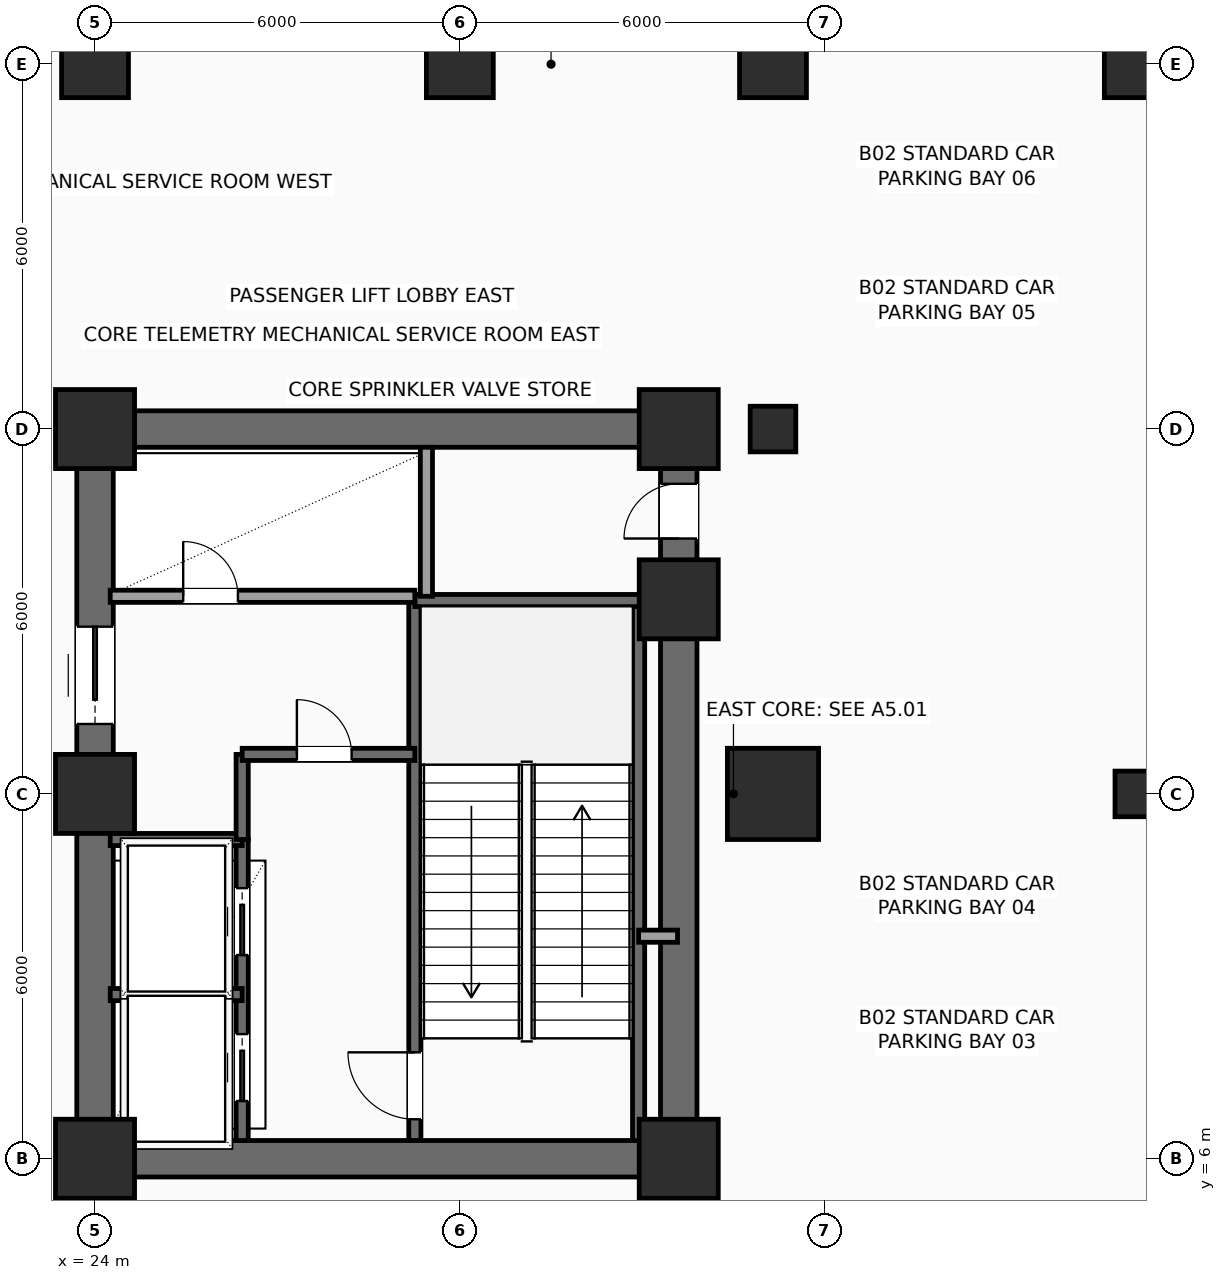
"""IFC4 building model, lengths in metres.
Left out: names, types, materials, properties, quantities, classifications, styles, units other than length and angle.
Written with IfcOpenShell. Run it as: python <this file> out.ifc"""

import sys

from ifc_helpers import new_model, si_unit, direction, frame, frame_2d, origin, origin_2d, place, context, subcontext, project, spatial, rectangle, hollow_rectangle, extrude, element, fill, save


model = new_model("IFC4")
c1 = context("Model", 3, precision=1e-05, world=origin(), true_north=direction((0.0, 1.0)))
c2 = subcontext(c1, "Body", "Model", "MODEL_VIEW")
j1 = project(units=[si_unit("LENGTHUNIT", "METRE"), si_unit("PLANEANGLEUNIT", "RADIAN")], contexts=[c1])
p1 = place(None, origin())
s1 = spatial("IfcSite", under=j1, at=p1, CompositionType="ELEMENT")
p2 = place(p1, origin())
s2 = spatial("IfcBuilding", under=s1, at=p2, CompositionType="ELEMENT")
p3 = place(p2, frame((0.0, 0.0, -9.6)))
s3 = spatial("IfcBuildingStorey", under=s2, at=p3, CompositionType="ELEMENT", Elevation=-9.6)
for number, where, z_axis, x_axis in (
    (1, (24.0, 6.0, 0.0), (0.0, 0.0, 1.0), (1.0, 0.0, 0.0)),
    (2, (24.0, 12.0, 0.0), (0.0, 0.0, 1.0), (1.0, 0.0, 0.0)),
    (3, (24.0, 18.0, 0.0), (0.0, 0.0, 1.0), (1.0, 0.0, 0.0)),
    (4, (33.6, 6.0, 0.0), (0.0, 0.0, 1.0), (1.0, 0.0, 0.0)),
    (5, (33.6, 15.2, 0.0), (0.0, 0.0, 1.0), (1.0, 0.0, 0.0)),
    (6, (33.6, 18.0, 0.0), (0.0, 0.0, 1.0), (1.0, 0.0, 0.0)),
):
    element("IfcColumn", number, at=place(p3, frame(where, z_axis=z_axis, x_axis=x_axis)), inside=s3, PredefinedType="COLUMN", context=c2, shape_type="SweptSolid", body=[
        extrude(rectangle(XDim=1.3, YDim=1.3, at=origin_2d()), origin(), (0.0, 0.0, 1.0), 4.8),
    ])
for number, where, z_axis, x_axis in (
    (7, (24.0, 24.0, 0.0), (0.0, 0.0, 1.0), (1.0, 0.0, 0.0)),
    (8, (30.0, 24.0, 0.0), (0.0, 0.0, 1.0), (1.0, 0.0, 0.0)),
):
    element("IfcColumn", number, at=place(p3, frame(where, z_axis=z_axis, x_axis=x_axis)), inside=s3, PredefinedType="COLUMN", context=c2, shape_type="SweptSolid", body=[
        extrude(rectangle(XDim=1.1, YDim=1.1, at=origin_2d()), origin(), (0.0, 0.0, 1.0), 4.8),
    ])
p4 = place(p3, frame((35.15, 12.0, 0.0), z_axis=(0.0, 0.0, 1.0), x_axis=(1.0, 0.0, 0.0)))
e9 = element("IfcColumn", 9, at=p4, inside=s3, PredefinedType="COLUMN", context=c2, shape_type="SweptSolid", body=[
    extrude(rectangle(XDim=1.5, YDim=1.5, at=origin_2d()), origin(), (0.0, 0.0, 1.0), 4.8),
])
p5 = place(p3, frame((35.15, 18.0, 0.0), z_axis=(0.0, 0.0, 1.0), x_axis=(1.0, 0.0, 0.0)))
e10 = element("IfcColumn", 10, at=p5, inside=s3, PredefinedType="COLUMN", context=c2, shape_type="SweptSolid", body=[
    extrude(hollow_rectangle(XDim=0.75, YDim=0.75, WallThickness=0.035, InnerFilletRadius=0.035, OuterFilletRadius=0.05, at=origin_2d()), origin(), (0.0, 0.0, 1.0), 4.8),
])
p6 = place(p3, frame((35.15, 24.0, 0.0), z_axis=(0.0, 0.0, 1.0), x_axis=(1.0, 0.0, 0.0)))
e11 = element("IfcColumn", 11, at=p6, inside=s3, PredefinedType="COLUMN", context=c2, shape_type="SweptSolid", body=[
    extrude(rectangle(XDim=1.1, YDim=1.1, at=origin_2d()), origin(), (0.0, 0.0, 1.0), 4.8),
])
p7 = place(p3, frame((41.15, 12.0, 0.0), z_axis=(0.0, 0.0, 1.0), x_axis=(1.0, 0.0, 0.0)))
e12 = element("IfcColumn", 12, at=p7, inside=s3, PredefinedType="COLUMN", context=c2, shape_type="SweptSolid", body=[
    extrude(hollow_rectangle(XDim=0.75, YDim=0.75, WallThickness=0.035, InnerFilletRadius=0.035, OuterFilletRadius=0.05, at=origin_2d()), origin(), (0.0, 0.0, 1.0), 4.8),
])
p8 = place(p3, frame((41.15, 24.0, 0.0), z_axis=(0.0, 0.0, 1.0), x_axis=(1.0, 0.0, 0.0)))
e13 = element("IfcColumn", 13, at=p8, inside=s3, PredefinedType="COLUMN", context=c2, shape_type="SweptSolid", body=[
    extrude(rectangle(XDim=1.1, YDim=1.1, at=origin_2d()), origin(), (0.0, 0.0, 1.0), 4.8),
])
for number, where, z_axis, x_axis in (
    (14, (24.0, 6.0, 0.0), (0.0, 0.0, 1.0), (1.0, 0.0, 0.0)),
    (15, (24.0, 18.0, 0.0), (0.0, 0.0, 1.0), (1.0, 0.0, 0.0)),
):
    element("IfcWall", number, at=place(p3, frame(where, z_axis=z_axis, x_axis=x_axis)), inside=s3, PredefinedType="SHEAR", context=c2, shape_type="SweptSolid", body=[
        extrude(rectangle(XDim=9.6, YDim=0.6, at=frame_2d((4.8, 0.0))), origin(), (0.0, 0.0, 1.0), 4.475),
    ])
p9 = place(p3, frame((24.0, 6.0, 0.0), z_axis=(0.0, 0.0, 1.0), x_axis=(0.0, 1.0, 0.0)))
e16 = element("IfcWall", 16, at=p9, inside=s3, PredefinedType="SHEAR", context=c2, shape_type="SweptSolid", body=[
    extrude(rectangle(XDim=12.0, YDim=0.6, at=frame_2d((6.0, 0.0))), origin(), (0.0, 0.0, 1.0), 4.475),
])
p10 = place(p9, frame((7.15, 0.0, 0.0)))
e17 = element("IfcOpeningElement", 17, at=p10, cuts=e16, PredefinedType="OPENING", context=c2, shape_type="SweptSolid", body=[
    extrude(rectangle(XDim=1.6, YDim=2.3, at=frame_2d((0.8, 1.15))), frame((0.0, 0.31, 0.0), z_axis=(0.0, -1.0, 0.0), x_axis=(1.0, 0.0, 0.0)), (0.0, 0.0, 1.0), 0.62),
])
p11 = place(p3, frame((33.6, 6.0, 0.0), z_axis=(0.0, 0.0, 1.0), x_axis=(0.0, 1.0, 0.0)))
e18 = element("IfcWall", 18, at=p11, inside=s3, PredefinedType="SHEAR", context=c2, shape_type="SweptSolid", body=[
    extrude(rectangle(XDim=12.0, YDim=0.6, at=frame_2d((6.0, 0.0))), origin(), (0.0, 0.0, 1.0), 4.475),
])
p12 = place(p11, frame((10.2, 0.0, 0.0)))
e19 = element("IfcOpeningElement", 19, at=p12, cuts=e18, PredefinedType="OPENING", context=c2, shape_type="SweptSolid", body=[
    extrude(rectangle(XDim=0.9, YDim=2.15, at=frame_2d((0.45, 1.075))), frame((0.0, 0.31, 0.0), z_axis=(0.0, -1.0, 0.0), x_axis=(1.0, 0.0, 0.0)), (0.0, 0.0, 1.0), 0.62),
])
p13 = place(p3, frame((29.26, 6.3, 0.0), z_axis=(0.0, 0.0, 1.0), x_axis=(0.0, 1.0, 0.0)))
e20 = element("IfcWall", 20, at=p13, inside=s3, PredefinedType="SHEAR", context=c2, shape_type="SweptSolid", body=[
    extrude(rectangle(XDim=8.88, YDim=0.2, at=frame_2d((4.44, 0.0))), origin(), (0.0, 0.0, 1.0), 4.475),
])
p14 = place(p13, frame((0.35, 0.0, 0.0)))
e21 = element("IfcOpeningElement", 21, at=p14, cuts=e20, PredefinedType="OPENING", context=c2, shape_type="SweptSolid", body=[
    extrude(rectangle(XDim=1.1, YDim=2.2, at=frame_2d((0.55, 1.1))), frame((0.0, 0.11, 0.0), z_axis=(0.0, -1.0, 0.0), x_axis=(1.0, 0.0, 0.0)), (0.0, 0.0, 1.0), 0.22),
])
p15 = place(p3, frame((32.94, 6.3, 0.0), z_axis=(0.0, 0.0, 1.0), x_axis=(0.0, 1.0, 0.0)))
e22 = element("IfcWall", 22, at=p15, inside=s3, PredefinedType="SHEAR", context=c2, shape_type="SweptSolid", body=[
    extrude(rectangle(XDim=8.88, YDim=0.2, at=frame_2d((4.44, 0.0))), origin(), (0.0, 0.0, 1.0), 4.475),
])
p16 = place(p3, frame((29.26, 15.18, 0.0), z_axis=(0.0, 0.0, 1.0), x_axis=(1.0, 0.0, 0.0)))
e23 = element("IfcWall", 23, at=p16, inside=s3, PredefinedType="SHEAR", context=c2, shape_type="SweptSolid", body=[
    extrude(rectangle(XDim=4.04, YDim=0.2, at=frame_2d((2.02, 0.0))), origin(), (0.0, 0.0, 1.0), 4.475),
])
p17 = place(p3, frame((26.42, 6.3, 0.0), z_axis=(0.0, 0.0, 1.0), x_axis=(0.0, 1.0, 0.0)))
e24 = element("IfcWall", 24, at=p17, inside=s3, PredefinedType="SHEAR", context=c2, shape_type="SweptSolid", body=[
    extrude(rectangle(XDim=4.95, YDim=0.2, at=frame_2d((2.475, 0.0))), origin(), (0.0, 0.0, 1.0), 4.475),
])
p18 = place(p17, frame((0.65, 0.0, 0.0)))
e25 = element("IfcOpeningElement", 25, at=p18, cuts=e24, PredefinedType="OPENING", context=c2, shape_type="SweptSolid", body=[
    extrude(rectangle(XDim=1.1, YDim=2.2, at=frame_2d((0.55, 1.1))), frame((0.0, 0.11, 0.0), z_axis=(0.0, -1.0, 0.0), x_axis=(1.0, 0.0, 0.0)), (0.0, 0.0, 1.0), 0.22),
])
p19 = place(p17, frame((3.05, 0.0, 0.0)))
e26 = element("IfcOpeningElement", 26, at=p19, cuts=e24, PredefinedType="OPENING", context=c2, shape_type="SweptSolid", body=[
    extrude(rectangle(XDim=1.1, YDim=2.2, at=frame_2d((0.55, 1.1))), frame((0.0, 0.11, 0.0), z_axis=(0.0, -1.0, 0.0), x_axis=(1.0, 0.0, 0.0)), (0.0, 0.0, 1.0), 0.22),
])
for number, where, z_axis, x_axis in (
    (27, (24.25, 8.7, 0.0), (0.0, 0.0, 1.0), (1.0, 0.0, 0.0)),
    (28, (24.25, 11.25, 0.0), (0.0, 0.0, 1.0), (1.0, 0.0, 0.0)),
):
    element("IfcWall", number, at=place(p3, frame(where, z_axis=z_axis, x_axis=x_axis)), inside=s3, PredefinedType="SHEAR", context=c2, shape_type="SweptSolid", body=[
        extrude(rectangle(XDim=2.17, YDim=0.2, at=frame_2d((1.085, 0.0))), origin(), (0.0, 0.0, 1.0), 4.475),
    ])
p20 = place(p3, frame((26.42, 11.25, 0.0), z_axis=(0.0, 0.0, 1.0), x_axis=(0.0, 1.0, 0.0)))
e29 = element("IfcWall", 29, at=p20, inside=s3, PredefinedType="SHEAR", context=c2, shape_type="SweptSolid", body=[
    extrude(rectangle(XDim=1.4, YDim=0.2, at=frame_2d((0.7, 0.0))), origin(), (0.0, 0.0, 1.0), 4.475),
])
p21 = place(p3, frame((26.42, 12.65, 0.0), z_axis=(0.0, 0.0, 1.0), x_axis=(1.0, 0.0, 0.0)))
e30 = element("IfcWall", 30, at=p21, inside=s3, PredefinedType="SHEAR", context=c2, shape_type="SweptSolid", body=[
    extrude(rectangle(XDim=2.84, YDim=0.2, at=frame_2d((1.42, 0.0))), origin(), (0.0, 0.0, 1.0), 4.475),
])
p22 = place(p21, frame((0.9, 0.0, 0.0)))
e31 = element("IfcOpeningElement", 31, at=p22, cuts=e30, PredefinedType="OPENING", context=c2, shape_type="SweptSolid", body=[
    extrude(rectangle(XDim=0.9, YDim=2.15, at=frame_2d((0.45, 1.075))), frame((0.0, 0.11, 0.0), z_axis=(0.0, -1.0, 0.0), x_axis=(1.0, 0.0, 0.0)), (0.0, 0.0, 1.0), 0.22),
])
p23 = place(p3, frame((32.94, 9.66, 0.0), z_axis=(0.0, 0.0, 1.0), x_axis=(1.0, 0.0, 0.0)))
e32 = element("IfcWall", 32, at=p23, inside=s3, PredefinedType="SOLIDWALL", context=c2, shape_type="SweptSolid", body=[
    extrude(rectangle(XDim=0.64, YDim=0.2, at=frame_2d((0.32, 0.0))), origin(), (0.0, 0.0, 1.0), 4.475),
])
p24 = place(p3, frame((24.25, 15.25, 0.0), z_axis=(0.0, 0.0, 1.0), x_axis=(1.0, 0.0, 0.0)))
e33 = element("IfcWall", 33, at=p24, inside=s3, PredefinedType="SOLIDWALL", context=c2, shape_type="SweptSolid", body=[
    extrude(rectangle(XDim=5.01, YDim=0.2, at=frame_2d((2.505, 0.0))), origin(), (0.0, 0.0, 1.0), 4.475),
])
p25 = place(p24, frame((1.2, 0.0, 0.0)))
e34 = element("IfcOpeningElement", 34, at=p25, cuts=e33, PredefinedType="OPENING", context=c2, shape_type="SweptSolid", body=[
    extrude(rectangle(XDim=0.9, YDim=2.15, at=frame_2d((0.45, 1.075))), frame((0.0, 0.11, 0.0), z_axis=(0.0, -1.0, 0.0), x_axis=(1.0, 0.0, 0.0)), (0.0, 0.0, 1.0), 0.22),
])
p26 = place(p3, frame((29.45, 15.25, 0.0), z_axis=(0.0, 0.0, 1.0), x_axis=(0.0, 1.0, 0.0)))
e35 = element("IfcWall", 35, at=p26, inside=s3, PredefinedType="SOLIDWALL", context=c2, shape_type="SweptSolid", body=[
    extrude(rectangle(XDim=2.45, YDim=0.2, at=frame_2d((1.225, 0.0))), origin(), (0.0, 0.0, 1.0), 4.475),
])
p27 = place(p10, origin())
e36 = element("IfcDoor", 36, at=p27, inside=s3, OperationType="DOUBLE_DOOR_SLIDING", PredefinedType="DOOR", context=c2, shape_type="SweptSolid", body=[
    extrude(rectangle(XDim=1.6, YDim=2.3, at=frame_2d((0.8, 1.15))), frame((0.0, 0.025, 0.0), z_axis=(0.0, -1.0, 0.0), x_axis=(1.0, 0.0, 0.0)), (0.0, 0.0, 1.0), 0.05),
])
fill(e17, e36)
p28 = place(p12, origin())
e37 = element("IfcDoor", 37, at=p28, inside=s3, OperationType="SINGLE_SWING_LEFT", PredefinedType="DOOR", context=c2, shape_type="SweptSolid", body=[
    extrude(rectangle(XDim=0.9, YDim=2.15, at=frame_2d((0.45, 1.075))), frame((0.0, 0.025, 0.0), z_axis=(0.0, -1.0, 0.0), x_axis=(1.0, 0.0, 0.0)), (0.0, 0.0, 1.0), 0.05),
])
fill(e19, e37)
p29 = place(p14, origin())
e38 = element("IfcDoor", 38, at=p29, inside=s3, OperationType="SINGLE_SWING_RIGHT", PredefinedType="DOOR", context=c2, shape_type="SweptSolid", body=[
    extrude(rectangle(XDim=1.1, YDim=2.2, at=frame_2d((0.55, 1.1))), frame((0.0, 0.025, 0.0), z_axis=(0.0, -1.0, 0.0), x_axis=(1.0, 0.0, 0.0)), (0.0, 0.0, 1.0), 0.05),
])
fill(e21, e38)
p30 = place(p18, origin())
e39 = element("IfcDoor", 39, at=p30, inside=s3, OperationType="SLIDING_TO_LEFT", PredefinedType="DOOR", context=c2, shape_type="SweptSolid", body=[
    extrude(rectangle(XDim=1.1, YDim=2.2, at=frame_2d((0.55, 1.1))), frame((0.0, 0.025, 0.0), z_axis=(0.0, -1.0, 0.0), x_axis=(1.0, 0.0, 0.0)), (0.0, 0.0, 1.0), 0.05),
])
fill(e25, e39)
p31 = place(p19, origin())
e40 = element("IfcDoor", 40, at=p31, inside=s3, OperationType="SLIDING_TO_LEFT", PredefinedType="DOOR", context=c2, shape_type="SweptSolid", body=[
    extrude(rectangle(XDim=1.1, YDim=2.2, at=frame_2d((0.55, 1.1))), frame((0.0, 0.025, 0.0), z_axis=(0.0, -1.0, 0.0), x_axis=(1.0, 0.0, 0.0)), (0.0, 0.0, 1.0), 0.05),
])
fill(e26, e40)
p32 = place(p22, origin())
e41 = element("IfcDoor", 41, at=p32, inside=s3, OperationType="SINGLE_SWING_LEFT", PredefinedType="DOOR", context=c2, shape_type="SweptSolid", body=[
    extrude(rectangle(XDim=0.9, YDim=2.15, at=frame_2d((0.45, 1.075))), frame((0.0, 0.025, 0.0), z_axis=(0.0, -1.0, 0.0), x_axis=(1.0, 0.0, 0.0)), (0.0, 0.0, 1.0), 0.05),
])
fill(e31, e41)
p33 = place(p25, origin())
e42 = element("IfcDoor", 42, at=p33, inside=s3, OperationType="SINGLE_SWING_LEFT", PredefinedType="DOOR", context=c2, shape_type="SweptSolid", body=[
    extrude(rectangle(XDim=0.9, YDim=2.15, at=frame_2d((0.45, 1.075))), frame((0.0, 0.025, 0.0), z_axis=(0.0, -1.0, 0.0), x_axis=(1.0, 0.0, 0.0)), (0.0, 0.0, 1.0), 0.05),
])
fill(e34, e42)
save(model, sys.argv[1])
